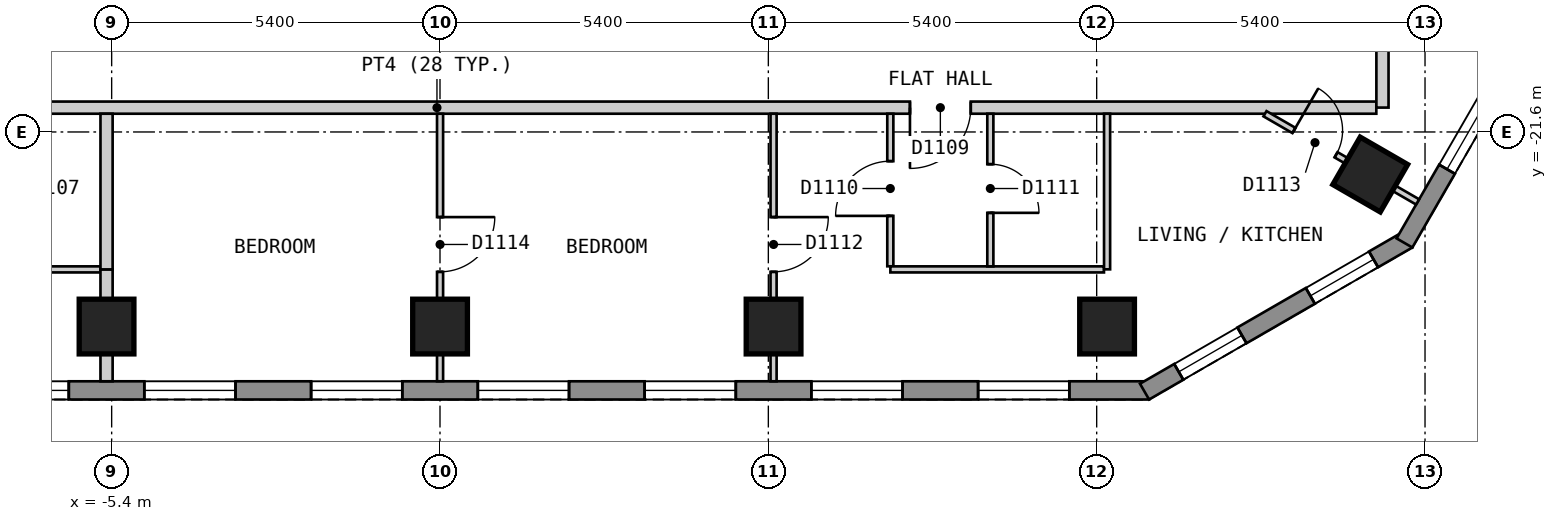
"""IFC4 building model, lengths in metres.
Left out: names, types, materials, properties, quantities, classifications, styles, units other than length and angle.
Written with IfcOpenShell. Run it as: python <this file> out.ifc"""

import sys

from ifc_helpers import new_model, si_unit, direction, frame, frame_2d, origin, origin_2d, place, context, subcontext, project, spatial, polyline, rectangle, outline, extrude, element, fill, save


model = new_model("IFC4")
c1 = context("Model", 3, precision=1e-05, world=origin(), true_north=direction((0.0, 1.0)))
c2 = subcontext(c1, "Body", "Model", "MODEL_VIEW")
j1 = project(units=[si_unit("LENGTHUNIT", "METRE"), si_unit("PLANEANGLEUNIT", "RADIAN")], contexts=[c1])
p1 = place(None, origin())
s1 = spatial("IfcSite", under=j1, at=p1, CompositionType="ELEMENT")
p2 = place(p1, origin())
s2 = spatial("IfcBuilding", under=s1, at=p2, CompositionType="ELEMENT")
p3 = place(p2, frame((0.0, 0.0, 150.6)))
s3 = spatial("IfcBuildingStorey", under=s2, at=p3, CompositionType="ELEMENT", Elevation=150.6)
for number, where, z_axis, x_axis in (
    (1, (-5.484, -24.8, 0.0), (0.0, 0.0, 1.0), (1.0, 0.0, 0.0)),
    (2, (0.001, -24.8, 0.0), (0.0, 0.0, 1.0), (1.0, 0.0, 0.0)),
    (3, (5.486, -24.8, 0.0), (0.0, 0.0, 1.0), (1.0, 0.0, 0.0)),
    (4, (10.971, -24.8, 0.0), (0.0, 0.0, 1.0), (1.0, 0.0, 0.0)),
    (5, (15.299, -22.3, 0.0), (0.0, 0.0, 1.0), (0.5, 0.866, 0.0)),
):
    element("IfcColumn", number, at=place(p3, frame(where, z_axis=z_axis, x_axis=x_axis)), inside=s3, PredefinedType="COLUMN", context=c2, shape_type="SweptSolid", body=[
        extrude(rectangle(XDim=0.9, YDim=0.9, at=origin_2d()), origin(), (0.0, 0.0, 1.0), 3.0),
    ])
p4 = place(p3, frame((-11.662, -25.85, 0.0), z_axis=(0.0, 0.0, 1.0), x_axis=(1.0, 0.0, 0.0)))
e6 = element("IfcWall", 6, at=p4, inside=s3, PredefinedType="SOLIDWALL", context=c2, shape_type="SweptSolid", body=[
    extrude(outline(polyline([(0.0, -0.15), (23.324, -0.15), (23.244, 0.15), (0.08, 0.15), (0.0, -0.15)])), origin(), (0.0, 0.0, 1.0), 2.6),
])
p5 = place(p4, frame((1.314, 0.0, 0.15)))
e7 = element("IfcOpeningElement", 7, at=p5, cuts=e6, PredefinedType="OPENING", context=c2, shape_type="SweptSolid", body=[
    extrude(rectangle(XDim=1.5, YDim=2.1, at=frame_2d((0.75, 1.05))), frame((0.0, 0.16, 0.0), z_axis=(0.0, -1.0, 0.0), x_axis=(1.0, 0.0, 0.0)), (0.0, 0.0, 1.0), 0.32),
])
p6 = place(p4, frame((4.057, 0.0, 0.15)))
e8 = element("IfcOpeningElement", 8, at=p6, cuts=e6, PredefinedType="OPENING", context=c2, shape_type="SweptSolid", body=[
    extrude(rectangle(XDim=1.5, YDim=2.1, at=frame_2d((0.75, 1.05))), frame((0.0, 0.16, 0.0), z_axis=(0.0, -1.0, 0.0), x_axis=(1.0, 0.0, 0.0)), (0.0, 0.0, 1.0), 0.32),
])
p7 = place(p4, frame((6.799, 0.0, 0.15)))
e9 = element("IfcOpeningElement", 9, at=p7, cuts=e6, PredefinedType="OPENING", context=c2, shape_type="SweptSolid", body=[
    extrude(rectangle(XDim=1.5, YDim=2.1, at=frame_2d((0.75, 1.05))), frame((0.0, 0.16, 0.0), z_axis=(0.0, -1.0, 0.0), x_axis=(1.0, 0.0, 0.0)), (0.0, 0.0, 1.0), 0.32),
])
p8 = place(p4, frame((9.542, 0.0, 0.15)))
e10 = element("IfcOpeningElement", 10, at=p8, cuts=e6, PredefinedType="OPENING", context=c2, shape_type="SweptSolid", body=[
    extrude(rectangle(XDim=1.5, YDim=2.1, at=frame_2d((0.75, 1.05))), frame((0.0, 0.16, 0.0), z_axis=(0.0, -1.0, 0.0), x_axis=(1.0, 0.0, 0.0)), (0.0, 0.0, 1.0), 0.32),
])
p9 = place(p4, frame((12.284, 0.0, 0.15)))
e11 = element("IfcOpeningElement", 11, at=p9, cuts=e6, PredefinedType="OPENING", context=c2, shape_type="SweptSolid", body=[
    extrude(rectangle(XDim=1.5, YDim=2.1, at=frame_2d((0.75, 1.05))), frame((0.0, 0.16, 0.0), z_axis=(0.0, -1.0, 0.0), x_axis=(1.0, 0.0, 0.0)), (0.0, 0.0, 1.0), 0.32),
])
p10 = place(p4, frame((15.027, 0.0, 0.15)))
e12 = element("IfcOpeningElement", 12, at=p10, cuts=e6, PredefinedType="OPENING", context=c2, shape_type="SweptSolid", body=[
    extrude(rectangle(XDim=1.5, YDim=2.1, at=frame_2d((0.75, 1.05))), frame((0.0, 0.16, 0.0), z_axis=(0.0, -1.0, 0.0), x_axis=(1.0, 0.0, 0.0)), (0.0, 0.0, 1.0), 0.32),
])
p11 = place(p4, frame((17.769, 0.0, 0.15)))
e13 = element("IfcOpeningElement", 13, at=p11, cuts=e6, PredefinedType="OPENING", context=c2, shape_type="SweptSolid", body=[
    extrude(rectangle(XDim=1.5, YDim=2.1, at=frame_2d((0.75, 1.05))), frame((0.0, 0.16, 0.0), z_axis=(0.0, -1.0, 0.0), x_axis=(1.0, 0.0, 0.0)), (0.0, 0.0, 1.0), 0.32),
])
p12 = place(p4, frame((20.512, 0.0, 0.15)))
e14 = element("IfcOpeningElement", 14, at=p12, cuts=e6, PredefinedType="OPENING", context=c2, shape_type="SweptSolid", body=[
    extrude(rectangle(XDim=1.5, YDim=2.1, at=frame_2d((0.75, 1.05))), frame((0.0, 0.16, 0.0), z_axis=(0.0, -1.0, 0.0), x_axis=(1.0, 0.0, 0.0)), (0.0, 0.0, 1.0), 0.32),
])
p13 = place(p3, frame((11.587, -25.87, 0.0), z_axis=(0.0, 0.0, 1.0), x_axis=(0.866022959057, 0.500004234368, 0.0)))
e15 = element("IfcWall", 15, at=p13, inside=s3, PredefinedType="SOLIDWALL", context=c2, shape_type="SweptSolid", body=[
    extrude(outline(polyline([(0.0, -0.15), (5.0, -0.15), (4.92, 0.15), (0.08, 0.15), (0.0, -0.15)])), origin(), (0.0, 0.0, 1.0), 2.6),
])
p14 = place(p13, frame((0.65, 0.0, 0.15)))
e16 = element("IfcOpeningElement", 16, at=p14, cuts=e15, PredefinedType="OPENING", context=c2, shape_type="SweptSolid", body=[
    extrude(rectangle(XDim=1.2, YDim=2.1, at=frame_2d((0.6, 1.05))), frame((0.0, 0.16, 0.0), z_axis=(0.0, -1.0, 0.0), x_axis=(1.0, 0.0, 0.0)), (0.0, 0.0, 1.0), 0.32),
])
p15 = place(p13, frame((3.149, 0.0, 0.15)))
e17 = element("IfcOpeningElement", 17, at=p15, cuts=e15, PredefinedType="OPENING", context=c2, shape_type="SweptSolid", body=[
    extrude(rectangle(XDim=1.2, YDim=2.1, at=frame_2d((0.6, 1.05))), frame((0.0, 0.16, 0.0), z_axis=(0.0, -1.0, 0.0), x_axis=(1.0, 0.0, 0.0)), (0.0, 0.0, 1.0), 0.32),
])
p16 = place(p3, frame((15.862, -23.425, 0.0), z_axis=(0.0, 0.0, 1.0), x_axis=(0.500017503135, 0.866015298109, 0.0)))
e18 = element("IfcWall", 18, at=p16, inside=s3, PredefinedType="SOLIDWALL", context=c2, shape_type="SweptSolid", body=[
    extrude(outline(polyline([(0.0, -0.15), (24.711, -0.15), (24.631, 0.15), (0.08, 0.15), (0.0, -0.15)])), origin(), (0.0, 0.0, 1.0), 2.6),
])
p17 = place(p16, frame((1.4, 0.0, 0.15)))
e19 = element("IfcOpeningElement", 19, at=p17, cuts=e18, PredefinedType="OPENING", context=c2, shape_type="SweptSolid", body=[
    extrude(rectangle(XDim=1.5, YDim=2.1, at=frame_2d((0.75, 1.05))), frame((0.0, 0.16, 0.0), z_axis=(0.0, -1.0, 0.0), x_axis=(1.0, 0.0, 0.0)), (0.0, 0.0, 1.0), 0.32),
])
p18 = place(p16, frame((4.316, 0.0, 0.15)))
e20 = element("IfcOpeningElement", 20, at=p18, cuts=e18, PredefinedType="OPENING", context=c2, shape_type="SweptSolid", body=[
    extrude(rectangle(XDim=1.5, YDim=2.1, at=frame_2d((0.75, 1.05))), frame((0.0, 0.16, 0.0), z_axis=(0.0, -1.0, 0.0), x_axis=(1.0, 0.0, 0.0)), (0.0, 0.0, 1.0), 0.32),
])
p19 = place(p16, frame((7.231, 0.0, 0.15)))
e21 = element("IfcOpeningElement", 21, at=p19, cuts=e18, PredefinedType="OPENING", context=c2, shape_type="SweptSolid", body=[
    extrude(rectangle(XDim=1.5, YDim=2.1, at=frame_2d((0.75, 1.05))), frame((0.0, 0.16, 0.0), z_axis=(0.0, -1.0, 0.0), x_axis=(1.0, 0.0, 0.0)), (0.0, 0.0, 1.0), 0.32),
])
p20 = place(p16, frame((10.147, 0.0, 0.15)))
e22 = element("IfcOpeningElement", 22, at=p20, cuts=e18, PredefinedType="OPENING", context=c2, shape_type="SweptSolid", body=[
    extrude(rectangle(XDim=1.5, YDim=2.1, at=frame_2d((0.75, 1.05))), frame((0.0, 0.16, 0.0), z_axis=(0.0, -1.0, 0.0), x_axis=(1.0, 0.0, 0.0)), (0.0, 0.0, 1.0), 0.32),
])
p21 = place(p16, frame((13.062, 0.0, 0.15)))
e23 = element("IfcOpeningElement", 23, at=p21, cuts=e18, PredefinedType="OPENING", context=c2, shape_type="SweptSolid", body=[
    extrude(rectangle(XDim=1.5, YDim=2.1, at=frame_2d((0.75, 1.05))), frame((0.0, 0.16, 0.0), z_axis=(0.0, -1.0, 0.0), x_axis=(1.0, 0.0, 0.0)), (0.0, 0.0, 1.0), 0.32),
])
p22 = place(p16, frame((15.977, 0.0, 0.15)))
e24 = element("IfcOpeningElement", 24, at=p22, cuts=e18, PredefinedType="OPENING", context=c2, shape_type="SweptSolid", body=[
    extrude(rectangle(XDim=1.5, YDim=2.1, at=frame_2d((0.75, 1.05))), frame((0.0, 0.16, 0.0), z_axis=(0.0, -1.0, 0.0), x_axis=(1.0, 0.0, 0.0)), (0.0, 0.0, 1.0), 0.32),
])
p23 = place(p16, frame((18.893, 0.0, 0.15)))
e25 = element("IfcOpeningElement", 25, at=p23, cuts=e18, PredefinedType="OPENING", context=c2, shape_type="SweptSolid", body=[
    extrude(rectangle(XDim=1.5, YDim=2.1, at=frame_2d((0.75, 1.05))), frame((0.0, 0.16, 0.0), z_axis=(0.0, -1.0, 0.0), x_axis=(1.0, 0.0, 0.0)), (0.0, 0.0, 1.0), 0.32),
])
p24 = place(p16, frame((21.809, 0.0, 0.15)))
e26 = element("IfcOpeningElement", 26, at=p24, cuts=e18, PredefinedType="OPENING", context=c2, shape_type="SweptSolid", body=[
    extrude(rectangle(XDim=1.5, YDim=2.1, at=frame_2d((0.75, 1.05))), frame((0.0, 0.16, 0.0), z_axis=(0.0, -1.0, 0.0), x_axis=(1.0, 0.0, 0.0)), (0.0, 0.0, 1.0), 0.32),
])
p25 = place(p3, frame((-15.499, -21.2, 0.0), z_axis=(0.0, 0.0, 1.0), x_axis=(1.0, 0.0, 0.0)))
e27 = element("IfcWall", 27, at=p25, inside=s3, PredefinedType="PARTITIONING", context=c2, shape_type="SweptSolid", body=[
    extrude(rectangle(XDim=30.898, YDim=0.2, at=frame_2d((15.449, 0.0))), origin(), (0.0, 0.0, 1.0), 2.6),
])
p26 = place(p25, frame((6.773, 0.0, 0.0)))
e28 = element("IfcOpeningElement", 28, at=p26, cuts=e27, PredefinedType="OPENING", context=c2, shape_type="SweptSolid", body=[
    extrude(rectangle(XDim=1.0, YDim=2.1, at=frame_2d((0.5, 1.05))), frame((0.0, 0.11, 0.0), z_axis=(0.0, -1.0, 0.0), x_axis=(1.0, 0.0, 0.0)), (0.0, 0.0, 1.0), 0.22),
])
p27 = place(p25, frame((23.228, 0.0, 0.0)))
e29 = element("IfcOpeningElement", 29, at=p27, cuts=e27, PredefinedType="OPENING", context=c2, shape_type="SweptSolid", body=[
    extrude(rectangle(XDim=1.0, YDim=2.1, at=frame_2d((0.5, 1.05))), frame((0.0, 0.11, 0.0), z_axis=(0.0, -1.0, 0.0), x_axis=(1.0, 0.0, 0.0)), (0.0, 0.0, 1.0), 0.22),
])
p28 = place(p3, frame((15.5, -21.199, 0.0), z_axis=(0.0, 0.0, 1.0), x_axis=(0.0, 1.0, 0.0)))
e30 = element("IfcWall", 30, at=p28, inside=s3, PredefinedType="PARTITIONING", context=c2, shape_type="SweptSolid", body=[
    extrude(rectangle(XDim=12.147, YDim=0.2, at=frame_2d((6.073, 0.0))), origin(), (0.0, 0.0, 1.0), 2.6),
])
p29 = place(p28, frame((8.348, 0.0, 0.0)))
e31 = element("IfcOpeningElement", 31, at=p29, cuts=e30, PredefinedType="OPENING", context=c2, shape_type="SweptSolid", body=[
    extrude(rectangle(XDim=1.0, YDim=2.1, at=frame_2d((0.5, 1.05))), frame((0.0, 0.11, 0.0), z_axis=(0.0, -1.0, 0.0), x_axis=(1.0, 0.0, 0.0)), (0.0, 0.0, 1.0), 0.22),
])
p30 = place(p3, frame((7.406, -21.3, 0.0), z_axis=(0.0, 0.0, 1.0), x_axis=(0.0, -1.0, 0.0)))
e32 = element("IfcWall", 32, at=p30, inside=s3, PredefinedType="PARTITIONING", context=c2, shape_type="SweptSolid", body=[
    extrude(rectangle(XDim=2.509, YDim=0.1, at=frame_2d((1.254, 0.0))), origin(), (0.0, 0.0, 1.0), 2.6),
])
p31 = place(p30, frame((0.78, 0.0, 0.0)))
e33 = element("IfcOpeningElement", 33, at=p31, cuts=e32, PredefinedType="OPENING", context=c2, shape_type="SweptSolid", body=[
    extrude(rectangle(XDim=0.9, YDim=2.1, at=frame_2d((0.45, 1.05))), frame((0.0, 0.06, 0.0), z_axis=(0.0, -1.0, 0.0), x_axis=(1.0, 0.0, 0.0)), (0.0, 0.0, 1.0), 0.12),
])
p32 = place(p3, frame((13.568, -21.3, 0.0), z_axis=(0.0, 0.0, 1.0), x_axis=(0.865885342641, -0.500242514586, 0.0)))
e34 = element("IfcWall", 34, at=p32, inside=s3, PredefinedType="PARTITIONING", context=c2, shape_type="SweptSolid", body=[
    extrude(rectangle(XDim=2.898, YDim=0.1, at=frame_2d((1.449, 0.0))), origin(), (0.0, 0.0, 1.0), 2.6),
])
p33 = place(p32, frame((0.55, 0.0, 0.0)))
e35 = element("IfcOpeningElement", 35, at=p33, cuts=e34, PredefinedType="OPENING", context=c2, shape_type="SweptSolid", body=[
    extrude(rectangle(XDim=0.8, YDim=2.1, at=frame_2d((0.4, 1.05))), frame((0.0, 0.06, 0.0), z_axis=(0.0, -1.0, 0.0), x_axis=(1.0, 0.0, 0.0)), (0.0, 0.0, 1.0), 0.12),
])
p34 = place(p3, frame((-9.048, -23.86, 0.0), z_axis=(0.0, 0.0, 1.0), x_axis=(1.0, 0.0, 0.0)))
e36 = element("IfcWall", 36, at=p34, inside=s3, PredefinedType="PARTITIONING", context=c2, shape_type="SweptSolid", body=[
    extrude(rectangle(XDim=3.464, YDim=0.1, at=frame_2d((1.732, 0.0))), origin(), (0.0, 0.0, 1.0), 2.6),
])
p35 = place(p3, frame((7.407, -23.86, 0.0), z_axis=(0.0, 0.0, 1.0), x_axis=(1.0, 0.0, 0.0)))
e37 = element("IfcWall", 37, at=p35, inside=s3, PredefinedType="PARTITIONING", context=c2, shape_type="SweptSolid", body=[
    extrude(rectangle(XDim=3.513, YDim=0.1, at=frame_2d((1.756, 0.0))), origin(), (0.0, 0.0, 1.0), 2.6),
])
p36 = place(p3, frame((5.486, -25.7, 0.0), z_axis=(0.0, 0.0, 1.0), x_axis=(0.0, 1.0, 0.0)))
e38 = element("IfcWall", 38, at=p36, inside=s3, PredefinedType="PARTITIONING", context=c2, shape_type="SweptSolid", body=[
    extrude(rectangle(XDim=4.4, YDim=0.1, at=frame_2d((2.2, 0.0))), origin(), (0.0, 0.0, 1.0), 2.6),
])
p37 = place(p36, frame((1.8, 0.0, 0.0)))
e39 = element("IfcOpeningElement", 39, at=p37, cuts=e38, PredefinedType="OPENING", context=c2, shape_type="SweptSolid", body=[
    extrude(rectangle(XDim=0.9, YDim=2.1, at=frame_2d((0.45, 1.05))), frame((0.0, 0.06, 0.0), z_axis=(0.0, -1.0, 0.0), x_axis=(1.0, 0.0, 0.0)), (0.0, 0.0, 1.0), 0.12),
])
p38 = place(p3, frame((9.051, -23.81, 0.0), z_axis=(0.0, 0.0, 1.0), x_axis=(0.0, 1.0, 0.0)))
e40 = element("IfcWall", 40, at=p38, inside=s3, PredefinedType="PARTITIONING", context=c2, shape_type="SweptSolid", body=[
    extrude(rectangle(XDim=2.51, YDim=0.1, at=frame_2d((1.255, 0.0))), origin(), (0.0, 0.0, 1.0), 2.6),
])
p39 = place(p38, frame((0.88, 0.0, 0.0)))
e41 = element("IfcOpeningElement", 41, at=p39, cuts=e40, PredefinedType="OPENING", context=c2, shape_type="SweptSolid", body=[
    extrude(rectangle(XDim=0.8, YDim=2.1, at=frame_2d((0.4, 1.05))), frame((0.0, 0.06, 0.0), z_axis=(0.0, -1.0, 0.0), x_axis=(1.0, 0.0, 0.0)), (0.0, 0.0, 1.0), 0.12),
])
p40 = place(p3, frame((10.971, -23.859, 0.0), z_axis=(0.0, 0.0, 1.0), x_axis=(0.0, 1.0, 0.0)))
e42 = element("IfcWall", 42, at=p40, inside=s3, PredefinedType="PARTITIONING", context=c2, shape_type="SweptSolid", body=[
    extrude(rectangle(XDim=2.559, YDim=0.1, at=frame_2d((1.279, 0.0))), origin(), (0.0, 0.0, 1.0), 2.6),
])
p41 = place(p3, frame((0.001, -25.7, 0.0), z_axis=(0.0, 0.0, 1.0), x_axis=(0.0, 1.0, 0.0)))
e43 = element("IfcWall", 43, at=p41, inside=s3, PredefinedType="PARTITIONING", context=c2, shape_type="SweptSolid", body=[
    extrude(rectangle(XDim=4.4, YDim=0.1, at=frame_2d((2.2, 0.0))), origin(), (0.0, 0.0, 1.0), 2.6),
])
p42 = place(p41, frame((1.8, 0.0, 0.0)))
e44 = element("IfcOpeningElement", 44, at=p42, cuts=e43, PredefinedType="OPENING", context=c2, shape_type="SweptSolid", body=[
    extrude(rectangle(XDim=0.9, YDim=2.1, at=frame_2d((0.45, 1.05))), frame((0.0, 0.06, 0.0), z_axis=(0.0, -1.0, 0.0), x_axis=(1.0, 0.0, 0.0)), (0.0, 0.0, 1.0), 0.12),
])
p43 = place(p3, frame((-5.484, -23.86, 0.0), z_axis=(0.0, 0.0, 1.0), x_axis=(0.0, -1.0, 0.0)))
e45 = element("IfcWall", 45, at=p43, inside=s3, PredefinedType="PARTITIONING", context=c2, shape_type="SweptSolid", body=[
    extrude(rectangle(XDim=1.84, YDim=0.2, at=frame_2d((0.92, 0.0))), origin(), (0.0, 0.0, 1.0), 2.6),
])
p44 = place(p3, frame((-5.484, -23.86, 0.0), z_axis=(0.0, 0.0, 1.0), x_axis=(0.0, 1.0, 0.0)))
e46 = element("IfcWall", 46, at=p44, inside=s3, PredefinedType="PARTITIONING", context=c2, shape_type="SweptSolid", body=[
    extrude(rectangle(XDim=2.56, YDim=0.2, at=frame_2d((1.28, 0.0))), origin(), (0.0, 0.0, 1.0), 2.6),
])
p45 = place(p6, origin())
e47 = element("IfcWindow", 47, at=p45, inside=s3, PartitioningType="SINGLE_PANEL", PredefinedType="WINDOW", context=c2, shape_type="SweptSolid", body=[
    extrude(rectangle(XDim=1.5, YDim=2.1, at=frame_2d((0.75, 1.05))), frame((0.0, 0.03, 0.0), z_axis=(0.0, -1.0, 0.0), x_axis=(1.0, 0.0, 0.0)), (0.0, 0.0, 1.0), 0.06),
])
fill(e8, e47)
p46 = place(p7, origin())
e48 = element("IfcWindow", 48, at=p46, inside=s3, PartitioningType="SINGLE_PANEL", PredefinedType="WINDOW", context=c2, shape_type="SweptSolid", body=[
    extrude(rectangle(XDim=1.5, YDim=2.1, at=frame_2d((0.75, 1.05))), frame((0.0, 0.03, 0.0), z_axis=(0.0, -1.0, 0.0), x_axis=(1.0, 0.0, 0.0)), (0.0, 0.0, 1.0), 0.06),
])
fill(e9, e48)
p47 = place(p8, origin())
e49 = element("IfcWindow", 49, at=p47, inside=s3, PartitioningType="SINGLE_PANEL", PredefinedType="WINDOW", context=c2, shape_type="SweptSolid", body=[
    extrude(rectangle(XDim=1.5, YDim=2.1, at=frame_2d((0.75, 1.05))), frame((0.0, 0.03, 0.0), z_axis=(0.0, -1.0, 0.0), x_axis=(1.0, 0.0, 0.0)), (0.0, 0.0, 1.0), 0.06),
])
fill(e10, e49)
p48 = place(p9, origin())
e50 = element("IfcWindow", 50, at=p48, inside=s3, PartitioningType="SINGLE_PANEL", PredefinedType="WINDOW", context=c2, shape_type="SweptSolid", body=[
    extrude(rectangle(XDim=1.5, YDim=2.1, at=frame_2d((0.75, 1.05))), frame((0.0, 0.03, 0.0), z_axis=(0.0, -1.0, 0.0), x_axis=(1.0, 0.0, 0.0)), (0.0, 0.0, 1.0), 0.06),
])
fill(e11, e50)
p49 = place(p10, origin())
e51 = element("IfcWindow", 51, at=p49, inside=s3, PartitioningType="SINGLE_PANEL", PredefinedType="WINDOW", context=c2, shape_type="SweptSolid", body=[
    extrude(rectangle(XDim=1.5, YDim=2.1, at=frame_2d((0.75, 1.05))), frame((0.0, 0.03, 0.0), z_axis=(0.0, -1.0, 0.0), x_axis=(1.0, 0.0, 0.0)), (0.0, 0.0, 1.0), 0.06),
])
fill(e12, e51)
p50 = place(p11, origin())
e52 = element("IfcWindow", 52, at=p50, inside=s3, PartitioningType="SINGLE_PANEL", PredefinedType="WINDOW", context=c2, shape_type="SweptSolid", body=[
    extrude(rectangle(XDim=1.5, YDim=2.1, at=frame_2d((0.75, 1.05))), frame((0.0, 0.03, 0.0), z_axis=(0.0, -1.0, 0.0), x_axis=(1.0, 0.0, 0.0)), (0.0, 0.0, 1.0), 0.06),
])
fill(e13, e52)
p51 = place(p12, origin())
e53 = element("IfcWindow", 53, at=p51, inside=s3, PartitioningType="SINGLE_PANEL", PredefinedType="WINDOW", context=c2, shape_type="SweptSolid", body=[
    extrude(rectangle(XDim=1.5, YDim=2.1, at=frame_2d((0.75, 1.05))), frame((0.0, 0.03, 0.0), z_axis=(0.0, -1.0, 0.0), x_axis=(1.0, 0.0, 0.0)), (0.0, 0.0, 1.0), 0.06),
])
fill(e14, e53)
p52 = place(p14, origin())
e54 = element("IfcWindow", 54, at=p52, inside=s3, PartitioningType="SINGLE_PANEL", PredefinedType="WINDOW", context=c2, shape_type="SweptSolid", body=[
    extrude(rectangle(XDim=1.2, YDim=2.1, at=frame_2d((0.6, 1.05))), frame((0.0, 0.03, 0.0), z_axis=(0.0, -1.0, 0.0), x_axis=(1.0, 0.0, 0.0)), (0.0, 0.0, 1.0), 0.06),
])
fill(e16, e54)
p53 = place(p15, origin())
e55 = element("IfcWindow", 55, at=p53, inside=s3, PartitioningType="SINGLE_PANEL", PredefinedType="WINDOW", context=c2, shape_type="SweptSolid", body=[
    extrude(rectangle(XDim=1.2, YDim=2.1, at=frame_2d((0.6, 1.05))), frame((0.0, 0.03, 0.0), z_axis=(0.0, -1.0, 0.0), x_axis=(1.0, 0.0, 0.0)), (0.0, 0.0, 1.0), 0.06),
])
fill(e17, e55)
p54 = place(p17, origin())
e56 = element("IfcWindow", 56, at=p54, inside=s3, PartitioningType="SINGLE_PANEL", PredefinedType="WINDOW", context=c2, shape_type="SweptSolid", body=[
    extrude(rectangle(XDim=1.5, YDim=2.1, at=frame_2d((0.75, 1.05))), frame((0.0, 0.03, 0.0), z_axis=(0.0, -1.0, 0.0), x_axis=(1.0, 0.0, 0.0)), (0.0, 0.0, 1.0), 0.06),
])
fill(e19, e56)
p55 = place(p27, origin())
e57 = element("IfcDoor", 57, at=p55, inside=s3, OperationType="SINGLE_SWING_LEFT", PredefinedType="DOOR", context=c2, shape_type="SweptSolid", body=[
    extrude(rectangle(XDim=1.0, YDim=2.1, at=frame_2d((0.5, 1.05))), frame((0.0, 0.025, 0.0), z_axis=(0.0, -1.0, 0.0), x_axis=(1.0, 0.0, 0.0)), (0.0, 0.0, 1.0), 0.05),
])
fill(e29, e57)
p56 = place(p31, origin())
e58 = element("IfcDoor", 58, at=p56, inside=s3, OperationType="SINGLE_SWING_RIGHT", PredefinedType="DOOR", context=c2, shape_type="SweptSolid", body=[
    extrude(rectangle(XDim=0.9, YDim=2.1, at=frame_2d((0.45, 1.05))), frame((0.0, 0.025, 0.0), z_axis=(0.0, -1.0, 0.0), x_axis=(1.0, 0.0, 0.0)), (0.0, 0.0, 1.0), 0.05),
])
fill(e33, e58)
p57 = place(p39, origin())
e59 = element("IfcDoor", 59, at=p57, inside=s3, OperationType="SINGLE_SWING_LEFT", PredefinedType="DOOR", context=c2, shape_type="SweptSolid", body=[
    extrude(rectangle(XDim=0.8, YDim=2.1, at=frame_2d((0.4, 1.05))), frame((0.0, 0.025, 0.0), z_axis=(0.0, -1.0, 0.0), x_axis=(1.0, 0.0, 0.0)), (0.0, 0.0, 1.0), 0.05),
])
fill(e41, e59)
p58 = place(p37, origin())
e60 = element("IfcDoor", 60, at=p58, inside=s3, OperationType="SINGLE_SWING_RIGHT", PredefinedType="DOOR", context=c2, shape_type="SweptSolid", body=[
    extrude(rectangle(XDim=0.9, YDim=2.1, at=frame_2d((0.45, 1.05))), frame((0.0, 0.025, 0.0), z_axis=(0.0, -1.0, 0.0), x_axis=(1.0, 0.0, 0.0)), (0.0, 0.0, 1.0), 0.05),
])
fill(e39, e60)
p59 = place(p33, origin())
e61 = element("IfcDoor", 61, at=p59, inside=s3, OperationType="SINGLE_SWING_LEFT", PredefinedType="DOOR", context=c2, shape_type="SweptSolid", body=[
    extrude(rectangle(XDim=0.8, YDim=2.1, at=frame_2d((0.4, 1.05))), frame((0.0, 0.025, 0.0), z_axis=(0.0, -1.0, 0.0), x_axis=(1.0, 0.0, 0.0)), (0.0, 0.0, 1.0), 0.05),
])
fill(e35, e61)
p60 = place(p42, origin())
e62 = element("IfcDoor", 62, at=p60, inside=s3, OperationType="SINGLE_SWING_RIGHT", PredefinedType="DOOR", context=c2, shape_type="SweptSolid", body=[
    extrude(rectangle(XDim=0.9, YDim=2.1, at=frame_2d((0.45, 1.05))), frame((0.0, 0.025, 0.0), z_axis=(0.0, -1.0, 0.0), x_axis=(1.0, 0.0, 0.0)), (0.0, 0.0, 1.0), 0.05),
])
fill(e44, e62)
save(model, sys.argv[1])
